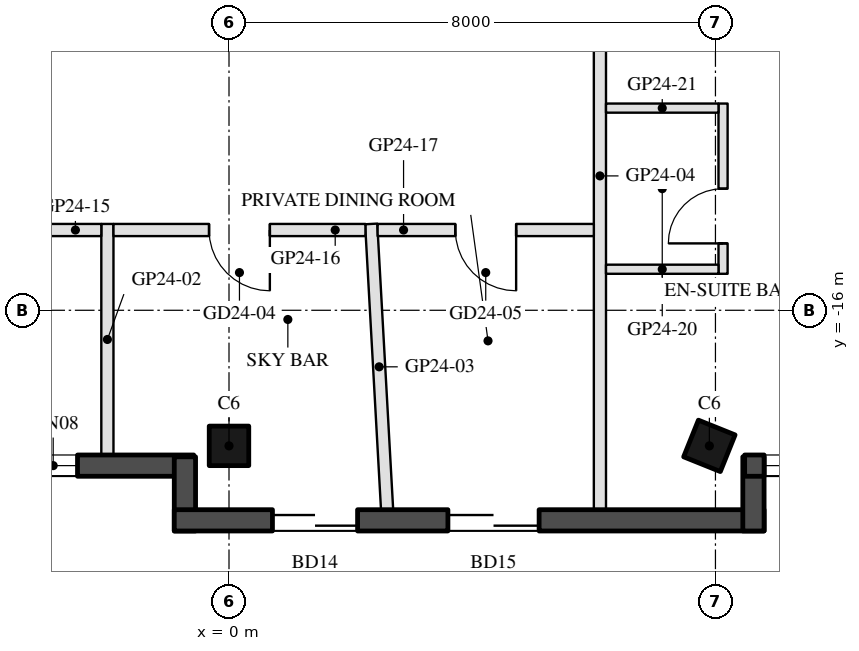
"""IFC4 building model, lengths in metres.
Left out: names, types, materials, properties, quantities, classifications, styles, units other than length and angle.
Written with IfcOpenShell. Run it as: python <this file> out.ifc"""

import sys

from ifc_helpers import new_model, si_unit, direction, frame, frame_2d, origin, origin_2d, place, context, subcontext, project, spatial, rectangle, hollow_rectangle, extrude, boolean, halfspace, element, fill, save


model = new_model("IFC4")
c1 = context("Model", 3, precision=1e-05, world=origin(), true_north=direction((0.0, 1.0)))
c2 = subcontext(c1, "Body", "Model", "MODEL_VIEW")
j1 = project(units=[si_unit("LENGTHUNIT", "METRE"), si_unit("PLANEANGLEUNIT", "RADIAN")], contexts=[c1])
p1 = place(None, origin())
s1 = spatial("IfcSite", under=j1, at=p1, CompositionType="ELEMENT")
p2 = place(p1, origin())
s2 = spatial("IfcBuilding", under=s1, at=p2, CompositionType="ELEMENT")
p3 = place(p2, frame((0.0, 0.0, 254.1)))
s3 = spatial("IfcBuildingStorey", under=s2, at=p3, CompositionType="ELEMENT", Elevation=254.1)
p4 = place(p3, frame((0.0, -18.23, 0.0), z_axis=(0.0, 0.151513133163, 0.98845524455), x_axis=(-1.0, 0.0, 0.0)))
e1 = element("IfcColumn", 1, at=p4, inside=s3, PredefinedType="COLUMN", context=c2, shape_type="SweptSolid", body=[
    boolean("DIFFERENCE", boolean("DIFFERENCE", extrude(hollow_rectangle(XDim=0.65, YDim=0.65, WallThickness=0.03, at=origin_2d()), origin(), (0.0, 0.0, 1.0), 3.743), halfspace(frame((0.0, 0.0, 0.037), z_axis=(0.0, 0.0, 1.0), x_axis=(1.0, 0.0, 0.0)), True)), halfspace(frame((0.0, 0.0, 3.706), z_axis=(0.0, 0.0, 1.0), x_axis=(1.0, 0.0, 0.0)), False)),
])
p5 = place(p3, frame((7.9, -18.23, 0.0), z_axis=(-0.060805602285, 0.151232777417, 0.986626234075), x_axis=(0.998137511125, 0.004342411053, 0.060849423591)))
e2 = element("IfcColumn", 2, at=p5, inside=s3, PredefinedType="COLUMN", context=c2, shape_type="SweptSolid", body=[
    boolean("DIFFERENCE", boolean("DIFFERENCE", extrude(hollow_rectangle(XDim=0.65, YDim=0.65, WallThickness=0.03, at=origin_2d()), origin(), (0.0, 0.0, 1.0), 3.75), halfspace(frame((0.0, 0.0, 0.04), z_axis=(0.0, 0.0, 1.0), x_axis=(1.0, 0.0, 0.0)), True)), halfspace(frame((0.0, 0.0, 3.71), z_axis=(0.0, 0.0, 1.0), x_axis=(1.0, 0.0, 0.0)), False)),
])
p6 = place(p3, frame((-7.32, -18.555, 0.0), z_axis=(0.0, 0.0, 1.0), x_axis=(1.0, 0.0, 0.0)))
e3 = element("IfcWall", 3, at=p6, inside=s3, PredefinedType="SOLIDWALL", context=c2, shape_type="SweptSolid", body=[
    extrude(rectangle(XDim=6.74, YDim=0.35, at=frame_2d((3.37, 0.0))), origin(), (0.0, 0.0, 1.0), 3.55),
])
p7 = place(p6, frame((0.32, 0.0, 0.3)))
e4 = element("IfcOpeningElement", 4, at=p7, cuts=e3, PredefinedType="OPENING", context=c2, shape_type="SweptSolid", body=[
    extrude(rectangle(XDim=1.0, YDim=2.65, at=frame_2d((0.5, 1.325))), frame((0.0, 0.185, 0.0), z_axis=(0.0, -1.0, 0.0), x_axis=(1.0, 0.0, 0.0)), (0.0, 0.0, 1.0), 0.37),
])
p8 = place(p6, frame((2.229, 0.0, 0.0)))
e5 = element("IfcOpeningElement", 5, at=p8, cuts=e3, PredefinedType="OPENING", context=c2, shape_type="SweptSolid", body=[
    extrude(rectangle(XDim=1.5, YDim=2.4, at=frame_2d((0.75, 1.2))), frame((0.0, 0.185, 0.0), z_axis=(0.0, -1.0, 0.0), x_axis=(1.0, 0.0, 0.0)), (0.0, 0.0, 1.0), 0.37),
])
p9 = place(p6, frame((4.029, 0.0, 0.3)))
e6 = element("IfcOpeningElement", 6, at=p9, cuts=e3, PredefinedType="OPENING", context=c2, shape_type="SweptSolid", body=[
    extrude(rectangle(XDim=0.8, YDim=2.65, at=frame_2d((0.4, 1.325))), frame((0.0, 0.185, 0.0), z_axis=(0.0, -1.0, 0.0), x_axis=(1.0, 0.0, 0.0)), (0.0, 0.0, 1.0), 0.37),
])
p10 = place(p3, frame((-0.725, -18.41, 0.0), z_axis=(0.0, 0.0, 1.0), x_axis=(0.0, -1.0, 0.0)))
e7 = element("IfcWall", 7, at=p10, inside=s3, PredefinedType="SOLIDWALL", context=c2, shape_type="SweptSolid", body=[
    extrude(rectangle(XDim=1.22, YDim=0.35, at=frame_2d((0.61, 0.0))), origin(), (0.0, 0.0, 1.0), 3.55),
])
p11 = place(p3, frame((-0.9, -19.455, 0.0), z_axis=(0.0, 0.0, 1.0), x_axis=(1.0, 0.0, 0.0)))
e8 = element("IfcWall", 8, at=p11, inside=s3, PredefinedType="SOLIDWALL", context=c2, shape_type="SweptSolid", body=[
    extrude(rectangle(XDim=9.7, YDim=0.35, at=frame_2d((4.85, 0.0))), origin(), (0.0, 0.0, 1.0), 3.55),
])
p12 = place(p11, frame((1.615, 0.0, 0.0)))
e9 = element("IfcOpeningElement", 9, at=p12, cuts=e8, PredefinedType="OPENING", context=c2, shape_type="SweptSolid", body=[
    extrude(rectangle(XDim=1.4, YDim=2.4, at=frame_2d((0.7, 1.2))), frame((0.0, 0.185, 0.0), z_axis=(0.0, -1.0, 0.0), x_axis=(1.0, 0.0, 0.0)), (0.0, 0.0, 1.0), 0.37),
])
p13 = place(p11, frame((4.5, 0.0, 0.0)))
e10 = element("IfcOpeningElement", 10, at=p13, cuts=e8, PredefinedType="OPENING", context=c2, shape_type="SweptSolid", body=[
    extrude(rectangle(XDim=1.5, YDim=2.4, at=frame_2d((0.75, 1.2))), frame((0.0, 0.185, 0.0), z_axis=(0.0, -1.0, 0.0), x_axis=(1.0, 0.0, 0.0)), (0.0, 0.0, 1.0), 0.37),
])
p14 = place(p3, frame((8.625, -19.63, 0.0), z_axis=(0.0, 0.0, 1.0), x_axis=(0.0, 1.0, 0.0)))
e11 = element("IfcWall", 11, at=p14, inside=s3, PredefinedType="SOLIDWALL", context=c2, shape_type="SweptSolid", body=[
    extrude(rectangle(XDim=1.22, YDim=0.35, at=frame_2d((0.61, 0.0))), origin(), (0.0, 0.0, 1.0), 3.55),
])
p15 = place(p3, frame((8.48, -18.555, 0.0), z_axis=(0.0, 0.0, 1.0), x_axis=(1.0, 0.0, 0.0)))
e12 = element("IfcWall", 12, at=p15, inside=s3, PredefinedType="SOLIDWALL", context=c2, shape_type="SweptSolid", body=[
    extrude(rectangle(XDim=6.74, YDim=0.35, at=frame_2d((3.37, 0.0))), origin(), (0.0, 0.0, 1.0), 3.55),
])
p16 = place(p15, frame((3.57, 0.0, 0.0)))
e13 = element("IfcOpeningElement", 13, at=p16, cuts=e12, PredefinedType="OPENING", context=c2, shape_type="SweptSolid", body=[
    extrude(rectangle(XDim=2.4, YDim=2.4, at=frame_2d((1.2, 1.2))), frame((0.0, 0.185, 0.0), z_axis=(0.0, -1.0, 0.0), x_axis=(1.0, 0.0, 0.0)), (0.0, 0.0, 1.0), 0.37),
])
p17 = place(p15, frame((0.32, 0.0, 0.3)))
e14 = element("IfcOpeningElement", 14, at=p17, cuts=e12, PredefinedType="OPENING", context=c2, shape_type="SweptSolid", body=[
    extrude(rectangle(XDim=2.9, YDim=2.65, at=frame_2d((1.45, 1.325))), frame((0.0, 0.185, 0.0), z_axis=(0.0, -1.0, 0.0), x_axis=(1.0, 0.0, 0.0)), (0.0, 0.0, 1.0), 0.37),
])
p18 = place(p3, frame((8.547, -10.997, 0.0), z_axis=(0.0, 0.0, 1.0), x_axis=(0.866025009528, -0.500000682871, 0.0)))
e15 = element("IfcWall", 15, at=p18, inside=s3, PredefinedType="SHEAR", context=c2, shape_type="SweptSolid", body=[
    extrude(rectangle(XDim=14.837, YDim=0.5, at=frame_2d((7.418, 0.0))), origin(), (0.0, 0.0, 1.0), 3.5),
])
p19 = place(p3, frame((-2.0, -18.38, 0.0), z_axis=(0.0, 0.0, 1.0), x_axis=(0.0, 1.0, 0.0)))
e16 = element("IfcWall", 16, at=p19, inside=s3, PredefinedType="PARTITIONING", context=c2, shape_type="SweptSolid", body=[
    extrude(rectangle(XDim=3.8, YDim=0.2, at=frame_2d((1.9, 0.0))), origin(), (0.0, 0.0, 1.0), 3.1),
])
p20 = place(p3, frame((2.6, -19.28, 0.0), z_axis=(0.0, 0.0, 1.0), x_axis=(-0.055599282702, 0.99845316353, 0.0)))
e17 = element("IfcWall", 17, at=p20, inside=s3, PredefinedType="PARTITIONING", context=c2, shape_type="SweptSolid", body=[
    extrude(rectangle(XDim=4.707, YDim=0.2, at=frame_2d((2.354, 0.0))), origin(), (0.0, 0.0, 1.0), 3.1),
])
p21 = place(p3, frame((6.1, -19.28, 0.0), z_axis=(0.0, 0.0, 1.0), x_axis=(0.0, 1.0, 0.0)))
e18 = element("IfcWall", 18, at=p21, inside=s3, PredefinedType="PARTITIONING", context=c2, shape_type="SweptSolid", body=[
    extrude(rectangle(XDim=10.98, YDim=0.2, at=frame_2d((5.49, 0.0))), origin(), (0.0, 0.0, 1.0), 3.1),
])
p22 = place(p3, frame((-2.1, -14.68, 0.0), z_axis=(0.0, 0.0, 1.0), x_axis=(-1.0, 0.0, 0.0)))
e19 = element("IfcWall", 19, at=p22, inside=s3, PredefinedType="PARTITIONING", context=c2, shape_type="SweptSolid", body=[
    extrude(rectangle(XDim=3.55, YDim=0.2, at=frame_2d((1.775, 0.0))), origin(), (0.0, 0.0, 1.0), 3.0),
])
p23 = place(p22, frame((1.275, 0.0, 0.0)))
e20 = element("IfcOpeningElement", 20, at=p23, cuts=e19, PredefinedType="OPENING", context=c2, shape_type="SweptSolid", body=[
    extrude(rectangle(XDim=1.0, YDim=2.1, at=frame_2d((0.5, 1.05))), frame((0.0, 0.11, 0.0), z_axis=(0.0, -1.0, 0.0), x_axis=(1.0, 0.0, 0.0)), (0.0, 0.0, 1.0), 0.22),
])
p24 = place(p3, frame((2.244, -14.68, 0.0), z_axis=(0.0, 0.0, 1.0), x_axis=(-1.0, 0.0, 0.0)))
e21 = element("IfcWall", 21, at=p24, inside=s3, PredefinedType="PARTITIONING", context=c2, shape_type="SweptSolid", body=[
    extrude(rectangle(XDim=4.144, YDim=0.2, at=frame_2d((2.072, 0.0))), origin(), (0.0, 0.0, 1.0), 3.0),
])
p25 = place(p24, frame((1.572, 0.0, 0.0)))
e22 = element("IfcOpeningElement", 22, at=p25, cuts=e21, PredefinedType="OPENING", context=c2, shape_type="SweptSolid", body=[
    extrude(rectangle(XDim=1.0, YDim=2.1, at=frame_2d((0.5, 1.05))), frame((0.0, 0.11, 0.0), z_axis=(0.0, -1.0, 0.0), x_axis=(1.0, 0.0, 0.0)), (0.0, 0.0, 1.0), 0.22),
])
p26 = place(p3, frame((6.0, -14.68, 0.0), z_axis=(0.0, 0.0, 1.0), x_axis=(-1.0, 0.0, 0.0)))
e23 = element("IfcWall", 23, at=p26, inside=s3, PredefinedType="PARTITIONING", context=c2, shape_type="SweptSolid", body=[
    extrude(rectangle(XDim=3.556, YDim=0.2, at=frame_2d((1.778, 0.0))), origin(), (0.0, 0.0, 1.0), 3.0),
])
p27 = place(p26, frame((1.278, 0.0, 0.0)))
e24 = element("IfcOpeningElement", 24, at=p27, cuts=e23, PredefinedType="OPENING", context=c2, shape_type="SweptSolid", body=[
    extrude(rectangle(XDim=1.0, YDim=2.1, at=frame_2d((0.5, 1.05))), frame((0.0, 0.11, 0.0), z_axis=(0.0, -1.0, 0.0), x_axis=(1.0, 0.0, 0.0)), (0.0, 0.0, 1.0), 0.22),
])
p28 = place(p3, frame((8.125, -15.4, 0.0), z_axis=(0.0, 0.0, 1.0), x_axis=(0.0, 1.0, 0.0)))
e25 = element("IfcWall", 25, at=p28, inside=s3, PredefinedType="PARTITIONING", context=c2, shape_type="SweptSolid", body=[
    extrude(rectangle(XDim=2.8, YDim=0.15, at=frame_2d((1.4, 0.0))), origin(), (0.0, 0.0, 1.0), 3.55),
])
p29 = place(p28, frame((0.5, 0.0, 0.0)))
e26 = element("IfcOpeningElement", 26, at=p29, cuts=e25, PredefinedType="OPENING", context=c2, shape_type="SweptSolid", body=[
    extrude(rectangle(XDim=0.9, YDim=2.1, at=frame_2d((0.45, 1.05))), frame((0.0, 0.085, 0.0), z_axis=(0.0, -1.0, 0.0), x_axis=(1.0, 0.0, 0.0)), (0.0, 0.0, 1.0), 0.17),
])
for number, where, z_axis, x_axis in (
    (27, (6.2, -15.325, 0.0), (0.0, 0.0, 1.0), (1.0, 0.0, 0.0)),
    (28, (6.2, -12.675, 0.0), (0.0, 0.0, 1.0), (1.0, 0.0, 0.0)),
):
    element("IfcWall", number, at=place(p3, frame(where, z_axis=z_axis, x_axis=x_axis)), inside=s3, PredefinedType="PARTITIONING", context=c2, shape_type="SweptSolid", body=[
        extrude(rectangle(XDim=1.85, YDim=0.15, at=frame_2d((0.925, 0.0))), origin(), (0.0, 0.0, 1.0), 3.0),
    ])
p30 = place(p9, origin())
e29 = element("IfcWindow", 29, at=p30, inside=s3, PartitioningType="SINGLE_PANEL", PredefinedType="WINDOW", context=c2, shape_type="SweptSolid", body=[
    extrude(rectangle(XDim=0.8, YDim=2.65, at=frame_2d((0.4, 1.325))), frame((0.0, 0.03, 0.0), z_axis=(0.0, -1.0, 0.0), x_axis=(1.0, 0.0, 0.0)), (0.0, 0.0, 1.0), 0.06),
])
fill(e6, e29)
p31 = place(p12, frame((1.4, 0.0, 0.0), z_axis=(0.0, 0.0, 1.0), x_axis=(-1.0, 0.0, 0.0)))
e30 = element("IfcDoor", 30, at=p31, inside=s3, OperationType="SLIDING_TO_LEFT", PredefinedType="DOOR", context=c2, shape_type="SweptSolid", body=[
    extrude(rectangle(XDim=1.4, YDim=2.4, at=frame_2d((0.7, 1.2))), frame((0.0, 0.025, 0.0), z_axis=(0.0, -1.0, 0.0), x_axis=(1.0, 0.0, 0.0)), (0.0, 0.0, 1.0), 0.05),
])
fill(e9, e30)
p32 = place(p13, frame((1.5, 0.0, 0.0), z_axis=(0.0, 0.0, 1.0), x_axis=(-1.0, 0.0, 0.0)))
e31 = element("IfcDoor", 31, at=p32, inside=s3, OperationType="SLIDING_TO_LEFT", PredefinedType="DOOR", context=c2, shape_type="SweptSolid", body=[
    extrude(rectangle(XDim=1.5, YDim=2.4, at=frame_2d((0.75, 1.2))), frame((0.0, 0.025, 0.0), z_axis=(0.0, -1.0, 0.0), x_axis=(1.0, 0.0, 0.0)), (0.0, 0.0, 1.0), 0.05),
])
fill(e10, e31)
p33 = place(p17, origin())
e32 = element("IfcWindow", 32, at=p33, inside=s3, PartitioningType="SINGLE_PANEL", PredefinedType="WINDOW", context=c2, shape_type="SweptSolid", body=[
    extrude(rectangle(XDim=2.9, YDim=2.65, at=frame_2d((1.45, 1.325))), frame((0.0, 0.03, 0.0), z_axis=(0.0, -1.0, 0.0), x_axis=(1.0, 0.0, 0.0)), (0.0, 0.0, 1.0), 0.06),
])
fill(e14, e32)
p34 = place(p25, origin())
e33 = element("IfcDoor", 33, at=p34, inside=s3, OperationType="SINGLE_SWING_LEFT", PredefinedType="DOOR", context=c2, shape_type="SweptSolid", body=[
    extrude(rectangle(XDim=1.0, YDim=2.1, at=frame_2d((0.5, 1.05))), frame((0.0, 0.025, 0.0), z_axis=(0.0, -1.0, 0.0), x_axis=(1.0, 0.0, 0.0)), (0.0, 0.0, 1.0), 0.05),
])
fill(e22, e33)
p35 = place(p27, origin())
e34 = element("IfcDoor", 34, at=p35, inside=s3, OperationType="SINGLE_SWING_LEFT", PredefinedType="DOOR", context=c2, shape_type="SweptSolid", body=[
    extrude(rectangle(XDim=1.0, YDim=2.1, at=frame_2d((0.5, 1.05))), frame((0.0, 0.025, 0.0), z_axis=(0.0, -1.0, 0.0), x_axis=(1.0, 0.0, 0.0)), (0.0, 0.0, 1.0), 0.05),
])
fill(e24, e34)
p36 = place(p29, origin())
e35 = element("IfcDoor", 35, at=p36, inside=s3, OperationType="SINGLE_SWING_LEFT", PredefinedType="DOOR", context=c2, shape_type="SweptSolid", body=[
    extrude(rectangle(XDim=0.9, YDim=2.1, at=frame_2d((0.45, 1.05))), frame((0.0, 0.025, 0.0), z_axis=(0.0, -1.0, 0.0), x_axis=(1.0, 0.0, 0.0)), (0.0, 0.0, 1.0), 0.05),
])
fill(e26, e35)
save(model, sys.argv[1])
